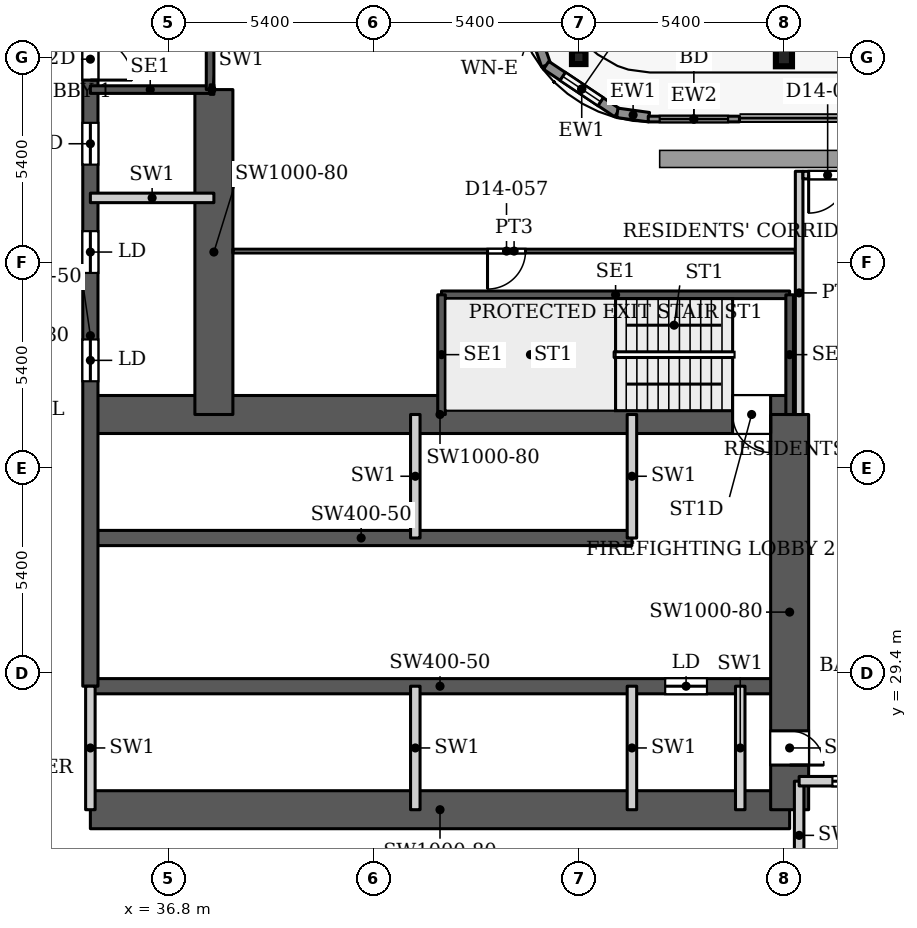
"""IFC4 building model, lengths in metres.
Left out: names, types, materials, properties, quantities, classifications, styles, units other than length and angle.
Written with IfcOpenShell. Run it as: python <this file> out.ifc"""

import sys

from ifc_helpers import new_model, si_unit, direction, frame, frame_2d, origin, origin_2d, place, context, subcontext, project, spatial, rectangle, hollow_rectangle, i_section, extrude, source, transform, mapped, element, fill, save


model = new_model("IFC4")
c1 = context("Model", 3, precision=1e-05, world=origin(), true_north=direction((0.0, 1.0)))
c2 = subcontext(c1, "Body", "Model", "MODEL_VIEW")
j1 = project(units=[si_unit("LENGTHUNIT", "METRE"), si_unit("PLANEANGLEUNIT", "RADIAN")], contexts=[c1])
p1 = place(None, origin())
s1 = spatial("IfcSite", under=j1, at=p1, CompositionType="ELEMENT")
p2 = place(p1, origin())
s2 = spatial("IfcBuilding", under=s1, at=p2, CompositionType="ELEMENT")
p3 = place(p2, frame((0.0, 0.0, 65.6)))
s3 = spatial("IfcBuildingStorey", under=s2, at=p3, CompositionType="ELEMENT", Elevation=65.6)
p4 = place(p3, frame((53.0, 45.6, 0.0), z_axis=(0.0, 0.0, 1.0), x_axis=(1.0, 0.0, 0.0)))
e1 = element("IfcColumn", 1, at=p4, inside=s3, PredefinedType="COLUMN", context=c2, shape_type="SweptSolid", body=[
    extrude(i_section(OverallWidth=0.424, OverallDepth=0.474, WebThickness=0.048, FlangeThickness=0.077, FilletRadius=0.014, at=origin_2d()), origin(), (0.0, 0.0, 1.0), 3.9),
])
p5 = place(p3, frame((47.6, 45.6, 0.0), z_axis=(0.0, 0.0, 1.0), x_axis=(1.0, 0.0, 0.0)))
e2 = element("IfcColumn", 2, at=p5, inside=s3, PredefinedType="COLUMN", context=c2, shape_type="SweptSolid", body=[
    extrude(hollow_rectangle(XDim=0.356, YDim=0.356, WallThickness=0.016, InnerFilletRadius=0.016, OuterFilletRadius=0.032, at=origin_2d()), origin(), (0.0, 0.0, 1.0), 3.9),
])
p6 = place(p3, frame((34.75, 25.8, 0.0), z_axis=(0.0, 0.0, 1.0), x_axis=(1.0, 0.0, 0.0)))
e3 = element("IfcWall", 3, at=p6, inside=s3, PredefinedType="SHEAR", context=c2, shape_type="SweptSolid", body=[
    extrude(rectangle(XDim=18.4, YDim=1.0, at=frame_2d((9.2, 0.0))), origin(), (0.0, 0.0, 1.0), 3.9),
])
p7 = place(p3, frame((34.75, 29.05, 0.0), z_axis=(0.0, 0.0, 1.0), x_axis=(1.0, 0.0, 0.0)))
e4 = element("IfcWall", 4, at=p7, inside=s3, PredefinedType="SHEAR", context=c2, shape_type="SweptSolid", body=[
    extrude(rectangle(XDim=18.4, YDim=0.4, at=frame_2d((9.2, 0.0))), origin(), (0.0, 0.0, 1.0), 3.9),
])
p8 = place(p7, frame((15.125, 0.0, 0.0)))
e5 = element("IfcOpeningElement", 5, at=p8, cuts=e4, PredefinedType="OPENING", context=c2, shape_type="SweptSolid", body=[
    extrude(rectangle(XDim=1.1, YDim=2.2, at=frame_2d((0.55, 1.1))), frame((0.0, 0.21, 0.0), z_axis=(0.0, -1.0, 0.0), x_axis=(1.0, 0.0, 0.0)), (0.0, 0.0, 1.0), 0.42),
])
p9 = place(p3, frame((34.75, 32.95, 0.0), z_axis=(0.0, 0.0, 1.0), x_axis=(1.0, 0.0, 0.0)))
e6 = element("IfcWall", 6, at=p9, inside=s3, PredefinedType="SHEAR", context=c2, shape_type="SweptSolid", body=[
    extrude(rectangle(XDim=14.25, YDim=0.4, at=frame_2d((7.125, 0.0))), origin(), (0.0, 0.0, 1.0), 3.9),
])
p10 = place(p3, frame((34.75, 36.2, 0.0), z_axis=(0.0, 0.0, 1.0), x_axis=(1.0, 0.0, 0.0)))
e7 = element("IfcWall", 7, at=p10, inside=s3, PredefinedType="SHEAR", context=c2, shape_type="SweptSolid", body=[
    extrude(rectangle(XDim=18.4, YDim=1.0, at=frame_2d((9.2, 0.0))), origin(), (0.0, 0.0, 1.0), 3.9),
])
p11 = place(p10, frame((16.9, 0.0, 0.0)))
e8 = element("IfcOpeningElement", 8, at=p11, cuts=e7, PredefinedType="OPENING", context=c2, shape_type="SweptSolid", body=[
    extrude(rectangle(XDim=1.0, YDim=2.2, at=frame_2d((0.5, 1.1))), frame((0.0, 0.51, 0.0), z_axis=(0.0, -1.0, 0.0), x_axis=(1.0, 0.0, 0.0)), (0.0, 0.0, 1.0), 1.02),
])
p12 = place(p3, frame((34.75, 29.05, 0.0), z_axis=(0.0, 0.0, 1.0), x_axis=(0.0, 1.0, 0.0)))
e9 = element("IfcWall", 9, at=p12, inside=s3, PredefinedType="SHEAR", context=c2, shape_type="SweptSolid", body=[
    extrude(rectangle(XDim=18.45, YDim=0.4, at=frame_2d((9.225, 0.0))), origin(), (0.0, 0.0, 1.0), 3.9),
])
p13 = place(p12, frame((8.025, 0.0, 0.0)))
e10 = element("IfcOpeningElement", 10, at=p13, cuts=e9, PredefinedType="OPENING", context=c2, shape_type="SweptSolid", body=[
    extrude(rectangle(XDim=1.1, YDim=2.2, at=frame_2d((0.55, 1.1))), frame((0.0, 0.21, 0.0), z_axis=(0.0, -1.0, 0.0), x_axis=(1.0, 0.0, 0.0)), (0.0, 0.0, 1.0), 0.42),
])
p14 = place(p12, frame((10.875, 0.0, 0.0)))
e11 = element("IfcOpeningElement", 11, at=p14, cuts=e9, PredefinedType="OPENING", context=c2, shape_type="SweptSolid", body=[
    extrude(rectangle(XDim=1.1, YDim=2.2, at=frame_2d((0.55, 1.1))), frame((0.0, 0.21, 0.0), z_axis=(0.0, -1.0, 0.0), x_axis=(1.0, 0.0, 0.0)), (0.0, 0.0, 1.0), 0.42),
])
p15 = place(p12, frame((13.725, 0.0, 0.0)))
e12 = element("IfcOpeningElement", 12, at=p15, cuts=e9, PredefinedType="OPENING", context=c2, shape_type="SweptSolid", body=[
    extrude(rectangle(XDim=1.1, YDim=2.2, at=frame_2d((0.55, 1.1))), frame((0.0, 0.21, 0.0), z_axis=(0.0, -1.0, 0.0), x_axis=(1.0, 0.0, 0.0)), (0.0, 0.0, 1.0), 0.42),
])
p16 = place(p12, frame((15.95, 0.0, 0.0)))
e13 = element("IfcOpeningElement", 13, at=p16, cuts=e9, PredefinedType="OPENING", context=c2, shape_type="SweptSolid", body=[
    extrude(rectangle(XDim=1.1, YDim=2.2, at=frame_2d((0.55, 1.1))), frame((0.0, 0.21, 0.0), z_axis=(0.0, -1.0, 0.0), x_axis=(1.0, 0.0, 0.0)), (0.0, 0.0, 1.0), 0.42),
])
p17 = place(p3, frame((38.0, 36.2, 0.0), z_axis=(0.0, 0.0, 1.0), x_axis=(0.0, 1.0, 0.0)))
e14 = element("IfcWall", 14, at=p17, inside=s3, PredefinedType="SHEAR", context=c2, shape_type="SweptSolid", body=[
    extrude(rectangle(XDim=8.55, YDim=1.0, at=frame_2d((4.275, 0.0))), origin(), (0.0, 0.0, 1.0), 3.9),
])
p18 = place(p3, frame((53.15, 25.8, 0.0), z_axis=(0.0, 0.0, 1.0), x_axis=(0.0, 1.0, 0.0)))
e15 = element("IfcWall", 15, at=p18, inside=s3, PredefinedType="SHEAR", context=c2, shape_type="SweptSolid", body=[
    extrude(rectangle(XDim=10.4, YDim=1.0, at=frame_2d((5.2, 0.0))), origin(), (0.0, 0.0, 1.0), 3.9),
])
p19 = place(p18, frame((1.175, 0.0, 0.0)))
e16 = element("IfcOpeningElement", 16, at=p19, cuts=e15, PredefinedType="OPENING", context=c2, shape_type="SweptSolid", body=[
    extrude(rectangle(XDim=0.9, YDim=2.2, at=frame_2d((0.45, 1.1))), frame((0.0, 0.51, 0.0), z_axis=(0.0, -1.0, 0.0), x_axis=(1.0, 0.0, 0.0)), (0.0, 0.0, 1.0), 1.02),
])
p20 = place(p3, frame((34.039, 24.353, 0.0), z_axis=(0.0, 0.0, 1.0), x_axis=(-0.929352825399, 0.369192803184, 0.0)))
e17 = element("IfcWall", 17, at=p20, inside=s3, PredefinedType="SOLIDWALL", context=c2, shape_type="SweptSolid", body=[
    extrude(rectangle(XDim=4.656, YDim=0.25, at=frame_2d((2.328, 0.0))), origin(), (0.0, 0.0, 1.0), 3.75),
])
p21 = place(p3, frame((46.018, 47.471, 0.0), z_axis=(0.0, 0.0, 1.0), x_axis=(0.328791208903, -0.944402637093, 0.0)))
e18 = element("IfcWall", 18, at=p21, inside=s3, PredefinedType="SOLIDWALL", context=c2, shape_type="SweptSolid", body=[
    extrude(rectangle(XDim=2.205, YDim=0.25, at=frame_2d((1.102, 0.0))), origin(), (0.0, 0.0, 1.0), 3.75),
])
p22 = place(p21, frame((0.503, 0.0, 0.6)))
e19 = element("IfcOpeningElement", 19, at=p22, cuts=e18, PredefinedType="OPENING", context=c2, shape_type="SweptSolid", body=[
    extrude(rectangle(XDim=1.2, YDim=2.1, at=frame_2d((0.6, 1.05))), frame((0.0, 0.135, 0.0), z_axis=(0.0, -1.0, 0.0), x_axis=(1.0, 0.0, 0.0)), (0.0, 0.0, 1.0), 0.27),
])
p23 = place(p3, frame((46.743, 45.389, 0.0), z_axis=(0.0, 0.0, 1.0), x_axis=(0.831449265529, -0.555600682912, 0.0)))
e20 = element("IfcWall", 20, at=p23, inside=s3, PredefinedType="SOLIDWALL", context=c2, shape_type="SweptSolid", body=[
    extrude(rectangle(XDim=2.251, YDim=0.25, at=frame_2d((1.126, 0.0))), origin(), (0.0, 0.0, 1.0), 3.75),
])
p24 = place(p23, frame((0.525, 0.0, 0.6)))
e21 = element("IfcOpeningElement", 21, at=p24, cuts=e20, PredefinedType="OPENING", context=c2, shape_type="SweptSolid", body=[
    extrude(rectangle(XDim=1.2, YDim=2.1, at=frame_2d((0.6, 1.05))), frame((0.0, 0.135, 0.0), z_axis=(0.0, -1.0, 0.0), x_axis=(1.0, 0.0, 0.0)), (0.0, 0.0, 1.0), 0.27),
])
p25 = place(p3, frame((48.615, 44.138, 0.0), z_axis=(0.0, 0.0, 1.0), x_axis=(0.990741504246, -0.135761819977, 0.0)))
e22 = element("IfcWall", 22, at=p25, inside=s3, PredefinedType="SOLIDWALL", context=c2, shape_type="SweptSolid", body=[
    extrude(rectangle(XDim=0.84, YDim=0.25, at=frame_2d((0.42, 0.0))), origin(), (0.0, 0.0, 1.0), 3.75),
])
p26 = place(p3, frame((49.43, 43.975, 0.0), z_axis=(0.0, 0.0, 1.0), x_axis=(1.0, 0.0, 0.0)))
e23 = element("IfcWall", 23, at=p26, inside=s3, PredefinedType="SOLIDWALL", context=c2, shape_type="SweptSolid", body=[
    extrude(rectangle(XDim=2.4, YDim=0.15, at=frame_2d((1.2, 0.0))), origin(), (0.0, 0.0, 1.0), 3.75),
])
p27 = place(p26, frame((0.3, 0.0, 0.0)))
e24 = element("IfcOpeningElement", 24, at=p27, cuts=e23, PredefinedType="OPENING", context=c2, shape_type="SweptSolid", body=[
    extrude(rectangle(XDim=1.8, YDim=2.4, at=frame_2d((0.9, 1.2))), frame((0.0, 0.085, 0.0), z_axis=(0.0, -1.0, 0.0), x_axis=(1.0, 0.0, 0.0)), (0.0, 0.0, 1.0), 0.17),
])
p28 = place(p3, frame((43.99, 39.35, 0.0), z_axis=(0.0, 0.0, 1.0), x_axis=(1.0, 0.0, 0.0)))
e25 = element("IfcWall", 25, at=p28, inside=s3, PredefinedType="SHEAR", context=c2, shape_type="SweptSolid", body=[
    extrude(rectangle(XDim=9.16, YDim=0.2, at=frame_2d((4.58, 0.0))), origin(), (0.0, 0.0, 1.0), 3.9),
])
for number, where, z_axis, x_axis in (
    (26, (43.99, 36.2, 0.0), (0.0, 0.0, 1.0), (0.0, 1.0, 0.0)),
    (27, (53.15, 36.2, 0.0), (0.0, 0.0, 1.0), (0.0, 1.0, 0.0)),
):
    element("IfcWall", number, at=place(p3, frame(where, z_axis=z_axis, x_axis=x_axis)), inside=s3, PredefinedType="SHEAR", context=c2, shape_type="SweptSolid", body=[
        extrude(rectangle(XDim=3.15, YDim=0.2, at=frame_2d((1.575, 0.0))), origin(), (0.0, 0.0, 1.0), 3.9),
    ])
p29 = place(p3, frame((34.75, 44.75, 0.0), z_axis=(0.0, 0.0, 1.0), x_axis=(1.0, 0.0, 0.0)))
e28 = element("IfcWall", 28, at=p29, inside=s3, PredefinedType="SHEAR", context=c2, shape_type="SweptSolid", body=[
    extrude(rectangle(XDim=3.15, YDim=0.2, at=frame_2d((1.575, 0.0))), origin(), (0.0, 0.0, 1.0), 3.9),
])
p30 = place(p3, frame((37.9, 44.75, 0.0), z_axis=(0.0, 0.0, 1.0), x_axis=(0.0, 1.0, 0.0)))
e29 = element("IfcWall", 29, at=p30, inside=s3, PredefinedType="SHEAR", context=c2, shape_type="SweptSolid", body=[
    extrude(rectangle(XDim=9.16, YDim=0.2, at=frame_2d((4.58, 0.0))), origin(), (0.0, 0.0, 1.0), 3.9),
])
for number, where, z_axis, x_axis in (
    (30, (34.75, 25.8, 0.0), (0.0, 0.0, 1.0), (0.0, 1.0, 0.0)),
    (31, (43.3, 25.8, 0.0), (0.0, 0.0, 1.0), (0.0, 1.0, 0.0)),
    (32, (43.3, 32.95, 0.0), (0.0, 0.0, 1.0), (0.0, 1.0, 0.0)),
    (33, (49.0, 25.8, 0.0), (0.0, 0.0, 1.0), (0.0, 1.0, 0.0)),
    (34, (49.0, 32.95, 0.0), (0.0, 0.0, 1.0), (0.0, 1.0, 0.0)),
    (35, (51.85, 25.8, 0.0), (0.0, 0.0, 1.0), (0.0, 1.0, 0.0)),
):
    element("IfcWall", number, at=place(p3, frame(where, z_axis=z_axis, x_axis=x_axis)), inside=s3, PredefinedType="PARTITIONING", context=c2, shape_type="SweptSolid", body=[
        extrude(rectangle(XDim=3.25, YDim=0.25, at=frame_2d((1.625, 0.0))), origin(), (0.0, 0.0, 1.0), 3.9),
    ])
p31 = place(p3, frame((53.4, 23.7, 0.0), z_axis=(0.0, 0.0, 1.0), x_axis=(0.0, 1.0, 0.0)))
e36 = element("IfcWall", 36, at=p31, inside=s3, PredefinedType="PARTITIONING", context=c2, shape_type="SweptSolid", body=[
    extrude(rectangle(XDim=2.85, YDim=0.25, at=frame_2d((1.425, 0.0))), origin(), (0.0, 0.0, 1.0), 3.9),
])
p32 = place(p3, frame((53.4, 26.55, 0.0), z_axis=(0.0, 0.0, 1.0), x_axis=(1.0, 0.0, 0.0)))
e37 = element("IfcWall", 37, at=p32, inside=s3, PredefinedType="PARTITIONING", context=c2, shape_type="SweptSolid", body=[
    extrude(rectangle(XDim=17.1, YDim=0.25, at=frame_2d((8.55, 0.0))), origin(), (0.0, 0.0, 1.0), 3.9),
])
p33 = place(p32, frame((0.875, 0.0, 0.0)))
e38 = element("IfcOpeningElement", 38, at=p33, cuts=e37, PredefinedType="OPENING", context=c2, shape_type="SweptSolid", body=[
    extrude(rectangle(XDim=1.1, YDim=2.2, at=frame_2d((0.55, 1.1))), frame((0.0, 0.135, 0.0), z_axis=(0.0, -1.0, 0.0), x_axis=(1.0, 0.0, 0.0)), (0.0, 0.0, 1.0), 0.27),
])
p34 = place(p32, frame((3.725, 0.0, 0.0)))
e39 = element("IfcOpeningElement", 39, at=p34, cuts=e37, PredefinedType="OPENING", context=c2, shape_type="SweptSolid", body=[
    extrude(rectangle(XDim=1.1, YDim=2.2, at=frame_2d((0.55, 1.1))), frame((0.0, 0.135, 0.0), z_axis=(0.0, -1.0, 0.0), x_axis=(1.0, 0.0, 0.0)), (0.0, 0.0, 1.0), 0.27),
])
p35 = place(p32, frame((6.575, 0.0, 0.0)))
e40 = element("IfcOpeningElement", 40, at=p35, cuts=e37, PredefinedType="OPENING", context=c2, shape_type="SweptSolid", body=[
    extrude(rectangle(XDim=1.1, YDim=2.2, at=frame_2d((0.55, 1.1))), frame((0.0, 0.135, 0.0), z_axis=(0.0, -1.0, 0.0), x_axis=(1.0, 0.0, 0.0)), (0.0, 0.0, 1.0), 0.27),
])
p36 = place(p32, frame((9.425, 0.0, 0.0)))
e41 = element("IfcOpeningElement", 41, at=p36, cuts=e37, PredefinedType="OPENING", context=c2, shape_type="SweptSolid", body=[
    extrude(rectangle(XDim=1.1, YDim=2.2, at=frame_2d((0.55, 1.1))), frame((0.0, 0.135, 0.0), z_axis=(0.0, -1.0, 0.0), x_axis=(1.0, 0.0, 0.0)), (0.0, 0.0, 1.0), 0.27),
])
p37 = place(p32, frame((12.275, 0.0, 0.0)))
e42 = element("IfcOpeningElement", 42, at=p37, cuts=e37, PredefinedType="OPENING", context=c2, shape_type="SweptSolid", body=[
    extrude(rectangle(XDim=1.1, YDim=2.2, at=frame_2d((0.55, 1.1))), frame((0.0, 0.135, 0.0), z_axis=(0.0, -1.0, 0.0), x_axis=(1.0, 0.0, 0.0)), (0.0, 0.0, 1.0), 0.27),
])
p38 = place(p32, frame((15.125, 0.0, 0.0)))
e43 = element("IfcOpeningElement", 43, at=p38, cuts=e37, PredefinedType="OPENING", context=c2, shape_type="SweptSolid", body=[
    extrude(rectangle(XDim=1.1, YDim=2.2, at=frame_2d((0.55, 1.1))), frame((0.0, 0.135, 0.0), z_axis=(0.0, -1.0, 0.0), x_axis=(1.0, 0.0, 0.0)), (0.0, 0.0, 1.0), 0.27),
])
p39 = place(p3, frame((34.75, 41.9, 0.0), z_axis=(0.0, 0.0, 1.0), x_axis=(1.0, 0.0, 0.0)))
e44 = element("IfcWall", 44, at=p39, inside=s3, PredefinedType="PARTITIONING", context=c2, shape_type="SweptSolid", body=[
    extrude(rectangle(XDim=3.25, YDim=0.25, at=frame_2d((1.625, 0.0))), origin(), (0.0, 0.0, 1.0), 3.9),
])
p40 = place(p3, frame((37.9, 44.75, 0.0), z_axis=(0.0, 0.0, 1.0), x_axis=(1.0, 0.0, 0.0)))
e45 = element("IfcWall", 45, at=p40, inside=s3, PredefinedType="PARTITIONING", context=c2, shape_type="SweptSolid", body=[
    extrude(rectangle(XDim=0.1, YDim=0.25, at=frame_2d((0.05, 0.0))), origin(), (0.0, 0.0, 1.0), 3.9),
])
p41 = place(p3, frame((38.499, 40.5, 0.0), z_axis=(0.0, 0.0, 1.0), x_axis=(1.0, 0.0, 0.0)))
e46 = element("IfcWall", 46, at=p41, inside=s3, PredefinedType="PARTITIONING", context=c2, shape_type="SweptSolid", body=[
    extrude(rectangle(XDim=14.801, YDim=0.1, at=frame_2d((7.4, 0.0))), origin(), (0.0, 0.0, 1.0), 3.6),
])
p42 = place(p41, frame((6.701, 0.0, 0.0)))
e47 = element("IfcOpeningElement", 47, at=p42, cuts=e46, PredefinedType="OPENING", context=c2, shape_type="SweptSolid", body=[
    extrude(rectangle(XDim=1.0, YDim=2.1, at=frame_2d((0.5, 1.05))), frame((0.0, 0.06, 0.0), z_axis=(0.0, -1.0, 0.0), x_axis=(1.0, 0.0, 0.0)), (0.0, 0.0, 1.0), 0.12),
])
p43 = place(p3, frame((53.4, 36.199, 0.0), z_axis=(0.0, 0.0, 1.0), x_axis=(0.0, 1.0, 0.0)))
e48 = element("IfcWall", 48, at=p43, inside=s3, PredefinedType="PARTITIONING", context=c2, shape_type="SweptSolid", body=[
    extrude(rectangle(XDim=6.401, YDim=0.2, at=frame_2d((3.201, 0.0))), origin(), (0.0, 0.0, 1.0), 3.6),
])
p44 = place(p3, frame((53.5, 42.5, 0.0), z_axis=(0.0, 0.0, 1.0), x_axis=(1.0, 0.0, 0.0)))
e49 = element("IfcWall", 49, at=p44, inside=s3, PredefinedType="PARTITIONING", context=c2, shape_type="SweptSolid", body=[
    extrude(rectangle(XDim=2.2, YDim=0.2, at=frame_2d((1.1, 0.0))), origin(), (0.0, 0.0, 1.0), 3.6),
])
p45 = place(p44, frame((0.15, 0.0, 0.0)))
e50 = element("IfcOpeningElement", 50, at=p45, cuts=e49, PredefinedType="OPENING", context=c2, shape_type="SweptSolid", body=[
    extrude(rectangle(XDim=1.0, YDim=2.1, at=frame_2d((0.5, 1.05))), frame((0.0, 0.11, 0.0), z_axis=(0.0, -1.0, 0.0), x_axis=(1.0, 0.0, 0.0)), (0.0, 0.0, 1.0), 0.22),
])
m1 = source(origin(), c2, "Body", "SweptSolid", [
    extrude(rectangle(XDim=1.2, YDim=2.1, at=frame_2d((0.6, 1.05))), frame((0.0, 0.03, 0.0), z_axis=(0.0, -1.0, 0.0), x_axis=(1.0, 0.0, 0.0)), (0.0, 0.0, 1.0), 0.06),
])
p46 = place(p24, origin())
e51 = element("IfcWindow", 51, at=p46, inside=s3, PartitioningType="SINGLE_PANEL", PredefinedType="WINDOW", context=c2, shape_type="MappedRepresentation", body=[
    mapped(m1, transform((0.0, 0.0, 0.0), x_axis=(1.0, 0.0, 0.0), y_axis=(0.0, 1.0, 0.0), z_axis=(0.0, 0.0, 1.0), scale=1.0)),
])
fill(e21, e51)
m2 = source(origin(), c2, "Body", "SweptSolid", [
    extrude(rectangle(XDim=1.8, YDim=2.4, at=frame_2d((0.9, 1.2))), frame((0.0, 0.025, 0.0), z_axis=(0.0, -1.0, 0.0), x_axis=(1.0, 0.0, 0.0)), (0.0, 0.0, 1.0), 0.05),
])
p47 = place(p27, origin())
e52 = element("IfcDoor", 52, at=p47, inside=s3, OperationType="SLIDING_TO_LEFT", PredefinedType="DOOR", context=c2, shape_type="MappedRepresentation", body=[
    mapped(m2, transform((0.0, 0.0, 0.0), x_axis=(1.0, 0.0, 0.0), y_axis=(0.0, 1.0, 0.0), z_axis=(0.0, 0.0, 1.0), scale=1.0)),
])
fill(e24, e52)
m3 = source(origin(), c2, "Body", "SweptSolid", [
    extrude(rectangle(XDim=1.1, YDim=2.2, at=frame_2d((0.55, 1.1))), frame((0.0, 0.025, 0.0), z_axis=(0.0, -1.0, 0.0), x_axis=(1.0, 0.0, 0.0)), (0.0, 0.0, 1.0), 0.05),
])
p48 = place(p33, origin())
e53 = element("IfcDoor", 53, at=p48, inside=s3, OperationType="SLIDING_TO_LEFT", PredefinedType="DOOR", context=c2, shape_type="MappedRepresentation", body=[
    mapped(m3, transform((0.0, 0.0, 0.0), x_axis=(1.0, 0.0, 0.0), y_axis=(0.0, 1.0, 0.0), z_axis=(0.0, 0.0, 1.0), scale=1.0)),
])
fill(e38, e53)
p49 = place(p13, origin())
e54 = element("IfcDoor", 54, at=p49, inside=s3, OperationType="SLIDING_TO_LEFT", PredefinedType="DOOR", context=c2, shape_type="MappedRepresentation", body=[
    mapped(m3, transform((0.0, 0.0, 0.0), x_axis=(1.0, 0.0, 0.0), y_axis=(0.0, 1.0, 0.0), z_axis=(0.0, 0.0, 1.0), scale=1.0)),
])
fill(e10, e54)
p50 = place(p14, origin())
e55 = element("IfcDoor", 55, at=p50, inside=s3, OperationType="SLIDING_TO_LEFT", PredefinedType="DOOR", context=c2, shape_type="MappedRepresentation", body=[
    mapped(m3, transform((0.0, 0.0, 0.0), x_axis=(1.0, 0.0, 0.0), y_axis=(0.0, 1.0, 0.0), z_axis=(0.0, 0.0, 1.0), scale=1.0)),
])
fill(e11, e55)
p51 = place(p15, origin())
e56 = element("IfcDoor", 56, at=p51, inside=s3, OperationType="SLIDING_TO_LEFT", PredefinedType="DOOR", context=c2, shape_type="MappedRepresentation", body=[
    mapped(m3, transform((0.0, 0.0, 0.0), x_axis=(1.0, 0.0, 0.0), y_axis=(0.0, 1.0, 0.0), z_axis=(0.0, 0.0, 1.0), scale=1.0)),
])
fill(e12, e56)
p52 = place(p8, origin())
e57 = element("IfcDoor", 57, at=p52, inside=s3, OperationType="SLIDING_TO_LEFT", PredefinedType="DOOR", context=c2, shape_type="MappedRepresentation", body=[
    mapped(m3, transform((0.0, 0.0, 0.0), x_axis=(1.0, 0.0, 0.0), y_axis=(0.0, 1.0, 0.0), z_axis=(0.0, 0.0, 1.0), scale=1.0)),
])
fill(e5, e57)
m4 = source(origin(), c2, "Body", "SweptSolid", [
    extrude(rectangle(XDim=0.9, YDim=2.2, at=frame_2d((0.45, 1.1))), frame((0.0, 0.025, 0.0), z_axis=(0.0, -1.0, 0.0), x_axis=(1.0, 0.0, 0.0)), (0.0, 0.0, 1.0), 0.05),
])
p53 = place(p19, origin())
e58 = element("IfcDoor", 58, at=p53, inside=s3, OperationType="SINGLE_SWING_RIGHT", PredefinedType="DOOR", context=c2, shape_type="MappedRepresentation", body=[
    mapped(m4, transform((0.0, 0.0, 0.0), x_axis=(1.0, 0.0, 0.0), y_axis=(0.0, 1.0, 0.0), z_axis=(0.0, 0.0, 1.0), scale=1.0)),
])
fill(e16, e58)
m5 = source(origin(), c2, "Body", "SweptSolid", [
    extrude(rectangle(XDim=1.0, YDim=2.2, at=frame_2d((0.5, 1.1))), frame((0.0, 0.025, 0.0), z_axis=(0.0, -1.0, 0.0), x_axis=(1.0, 0.0, 0.0)), (0.0, 0.0, 1.0), 0.05),
])
p54 = place(p11, origin())
e59 = element("IfcDoor", 59, at=p54, inside=s3, OperationType="SINGLE_SWING_RIGHT", PredefinedType="DOOR", context=c2, shape_type="MappedRepresentation", body=[
    mapped(m5, transform((0.0, 0.0, 0.0), x_axis=(1.0, 0.0, 0.0), y_axis=(0.0, 1.0, 0.0), z_axis=(0.0, 0.0, 1.0), scale=1.0)),
])
fill(e8, e59)
m6 = source(origin(), c2, "Body", "SweptSolid", [
    extrude(rectangle(XDim=1.1, YDim=2.2, at=frame_2d((0.55, 1.1))), frame((0.0, 0.025, 0.0), z_axis=(0.0, -1.0, 0.0), x_axis=(1.0, 0.0, 0.0)), (0.0, 0.0, 1.0), 0.05),
])
p55 = place(p16, origin())
e60 = element("IfcDoor", 60, at=p55, inside=s3, OperationType="SINGLE_SWING_RIGHT", PredefinedType="DOOR", context=c2, shape_type="MappedRepresentation", body=[
    mapped(m6, transform((0.0, 0.0, 0.0), x_axis=(1.0, 0.0, 0.0), y_axis=(0.0, 1.0, 0.0), z_axis=(0.0, 0.0, 1.0), scale=1.0)),
])
fill(e13, e60)
m7 = source(origin(), c2, "Body", "SweptSolid", [
    extrude(rectangle(XDim=1.0, YDim=2.1, at=frame_2d((0.5, 1.05))), frame((0.0, 0.025, 0.0), z_axis=(0.0, -1.0, 0.0), x_axis=(1.0, 0.0, 0.0)), (0.0, 0.0, 1.0), 0.05),
])
p56 = place(p42, origin())
e61 = element("IfcDoor", 61, at=p56, inside=s3, OperationType="SINGLE_SWING_RIGHT", PredefinedType="DOOR", context=c2, shape_type="MappedRepresentation", body=[
    mapped(m7, transform((0.0, 0.0, 0.0), x_axis=(1.0, 0.0, 0.0), y_axis=(0.0, 1.0, 0.0), z_axis=(0.0, 0.0, 1.0), scale=1.0)),
])
fill(e47, e61)
m8 = source(origin(), c2, "Body", "SweptSolid", [
    extrude(rectangle(XDim=1.0, YDim=2.1, at=frame_2d((0.5, 1.05))), frame((0.0, 0.025, 0.0), z_axis=(0.0, -1.0, 0.0), x_axis=(1.0, 0.0, 0.0)), (0.0, 0.0, 1.0), 0.05),
])
p57 = place(p45, origin())
e62 = element("IfcDoor", 62, at=p57, inside=s3, OperationType="SINGLE_SWING_RIGHT", PredefinedType="DOOR", context=c2, shape_type="MappedRepresentation", body=[
    mapped(m8, transform((0.0, 0.0, 0.0), x_axis=(1.0, 0.0, 0.0), y_axis=(0.0, 1.0, 0.0), z_axis=(0.0, 0.0, 1.0), scale=1.0)),
])
fill(e50, e62)
save(model, sys.argv[1])
